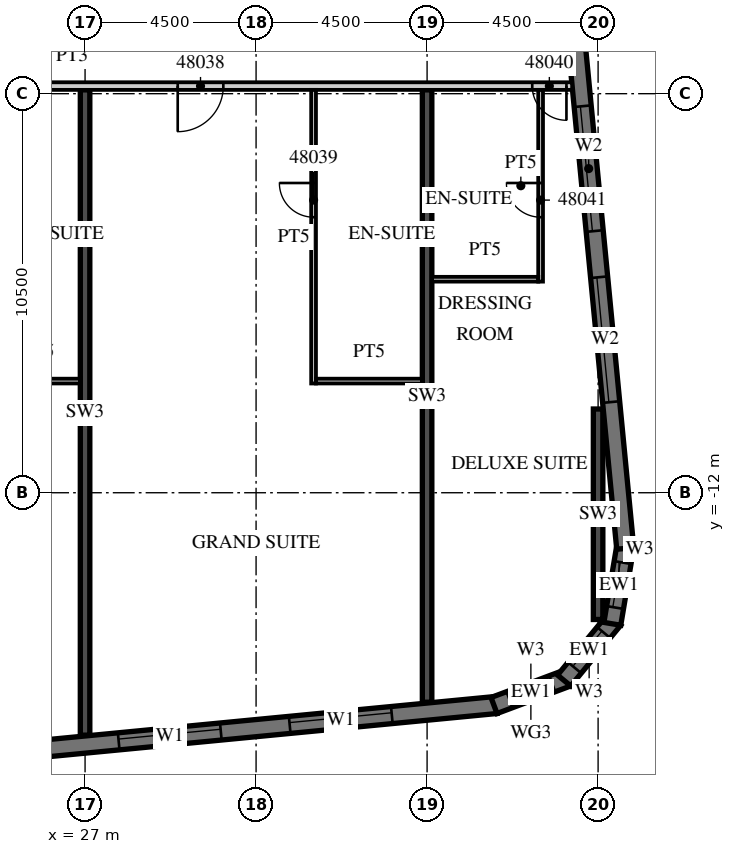
"""IFC4 building model, lengths in metres.
Left out: names, types, materials, properties, quantities, classifications, styles, units other than length and angle.
Written with IfcOpenShell. Run it as: python <this file> out.ifc"""

import sys

from ifc_helpers import new_model, si_unit, direction, frame, frame_2d, origin, place, context, subcontext, project, spatial, polyline, rectangle, outline, extrude, element, fill, save


model = new_model("IFC4")
c1 = context("Model", 3, precision=1e-05, world=origin(), true_north=direction((0.0, 1.0)))
c2 = subcontext(c1, "Body", "Model", "MODEL_VIEW")
j1 = project(units=[si_unit("LENGTHUNIT", "METRE"), si_unit("PLANEANGLEUNIT", "RADIAN")], contexts=[c1])
p1 = place(None, origin())
s1 = spatial("IfcSite", under=j1, at=p1, CompositionType="ELEMENT")
p2 = place(p1, origin())
s2 = spatial("IfcBuilding", under=s1, at=p2, CompositionType="ELEMENT")
p3 = place(p2, frame((0.0, 0.0, 199.9)))
s3 = spatial("IfcBuildingStorey", under=s2, at=p3, CompositionType="ELEMENT", Elevation=199.9)
p4 = place(p3, frame((27.0, -18.379, 0.0), z_axis=(0.0, 0.0, 1.0), x_axis=(0.0, 1.0, 0.0)))
e1 = element("IfcWall", 1, at=p4, inside=s3, PredefinedType="SHEAR", context=c2, shape_type="SweptSolid", body=[
    extrude(rectangle(XDim=16.979, YDim=0.25, at=frame_2d((8.489, 0.0))), origin(), (0.0, 0.0, 1.0), 3.3),
])
p5 = place(p3, frame((36.0, -17.512, 0.0), z_axis=(0.0, 0.0, 1.0), x_axis=(0.0, 1.0, 0.0)))
e2 = element("IfcWall", 2, at=p5, inside=s3, PredefinedType="SHEAR", context=c2, shape_type="SweptSolid", body=[
    extrude(rectangle(XDim=16.112, YDim=0.25, at=frame_2d((8.056, 0.0))), origin(), (0.0, 0.0, 1.0), 3.3),
])
p6 = place(p3, frame((40.5, -15.335, 0.0), z_axis=(0.0, 0.0, 1.0), x_axis=(0.0, 1.0, 0.0)))
e3 = element("IfcWall", 3, at=p6, inside=s3, PredefinedType="SHEAR", context=c2, shape_type="SweptSolid", body=[
    extrude(rectangle(XDim=5.538, YDim=0.25, at=frame_2d((2.769, 0.0))), origin(), (0.0, 0.0, 1.0), 3.3),
])
p7 = place(p3, frame((-13.521, -22.529, 0.0), z_axis=(0.0, 0.0, 1.0), x_axis=(0.995396436651, 0.095843277819, 0.0)))
e4 = element("IfcWall", 4, at=p7, inside=s3, PredefinedType="SOLIDWALL", context=c2, shape_type="SweptSolid", body=[
    extrude(rectangle(XDim=51.578, YDim=0.45, at=frame_2d((25.789, 0.0))), origin(), (0.0, 0.0, 1.0), 3.02),
])
p8 = place(p7, frame((0.91, 0.0, 0.45)))
e5 = element("IfcOpeningElement", 5, at=p8, cuts=e4, PredefinedType="OPENING", context=c2, shape_type="SweptSolid", body=[
    extrude(rectangle(XDim=2.7, YDim=2.25, at=frame_2d((1.35, 1.125))), frame((0.0, 0.235, 0.0), z_axis=(0.0, -1.0, 0.0), x_axis=(1.0, 0.0, 0.0)), (0.0, 0.0, 1.0), 0.47),
])
p9 = place(p7, frame((5.431, 0.0, 0.45)))
e6 = element("IfcOpeningElement", 6, at=p9, cuts=e4, PredefinedType="OPENING", context=c2, shape_type="SweptSolid", body=[
    extrude(rectangle(XDim=2.7, YDim=2.25, at=frame_2d((1.35, 1.125))), frame((0.0, 0.235, 0.0), z_axis=(0.0, -1.0, 0.0), x_axis=(1.0, 0.0, 0.0)), (0.0, 0.0, 1.0), 0.47),
])
p10 = place(p7, frame((9.952, 0.0, 0.45)))
e7 = element("IfcOpeningElement", 7, at=p10, cuts=e4, PredefinedType="OPENING", context=c2, shape_type="SweptSolid", body=[
    extrude(rectangle(XDim=2.7, YDim=2.25, at=frame_2d((1.35, 1.125))), frame((0.0, 0.235, 0.0), z_axis=(0.0, -1.0, 0.0), x_axis=(1.0, 0.0, 0.0)), (0.0, 0.0, 1.0), 0.47),
])
p11 = place(p7, frame((14.473, 0.0, 0.45)))
e8 = element("IfcOpeningElement", 8, at=p11, cuts=e4, PredefinedType="OPENING", context=c2, shape_type="SweptSolid", body=[
    extrude(rectangle(XDim=2.7, YDim=2.25, at=frame_2d((1.35, 1.125))), frame((0.0, 0.235, 0.0), z_axis=(0.0, -1.0, 0.0), x_axis=(1.0, 0.0, 0.0)), (0.0, 0.0, 1.0), 0.47),
])
p12 = place(p7, frame((18.994, 0.0, 0.45)))
e9 = element("IfcOpeningElement", 9, at=p12, cuts=e4, PredefinedType="OPENING", context=c2, shape_type="SweptSolid", body=[
    extrude(rectangle(XDim=2.7, YDim=2.25, at=frame_2d((1.35, 1.125))), frame((0.0, 0.235, 0.0), z_axis=(0.0, -1.0, 0.0), x_axis=(1.0, 0.0, 0.0)), (0.0, 0.0, 1.0), 0.47),
])
p13 = place(p7, frame((23.514, 0.0, 0.45)))
e10 = element("IfcOpeningElement", 10, at=p13, cuts=e4, PredefinedType="OPENING", context=c2, shape_type="SweptSolid", body=[
    extrude(rectangle(XDim=2.7, YDim=2.25, at=frame_2d((1.35, 1.125))), frame((0.0, 0.235, 0.0), z_axis=(0.0, -1.0, 0.0), x_axis=(1.0, 0.0, 0.0)), (0.0, 0.0, 1.0), 0.47),
])
p14 = place(p7, frame((28.035, 0.0, 0.45)))
e11 = element("IfcOpeningElement", 11, at=p14, cuts=e4, PredefinedType="OPENING", context=c2, shape_type="SweptSolid", body=[
    extrude(rectangle(XDim=2.7, YDim=2.25, at=frame_2d((1.35, 1.125))), frame((0.0, 0.235, 0.0), z_axis=(0.0, -1.0, 0.0), x_axis=(1.0, 0.0, 0.0)), (0.0, 0.0, 1.0), 0.47),
])
p15 = place(p7, frame((32.556, 0.0, 0.45)))
e12 = element("IfcOpeningElement", 12, at=p15, cuts=e4, PredefinedType="OPENING", context=c2, shape_type="SweptSolid", body=[
    extrude(rectangle(XDim=2.7, YDim=2.25, at=frame_2d((1.35, 1.125))), frame((0.0, 0.235, 0.0), z_axis=(0.0, -1.0, 0.0), x_axis=(1.0, 0.0, 0.0)), (0.0, 0.0, 1.0), 0.47),
])
p16 = place(p7, frame((37.077, 0.0, 0.45)))
e13 = element("IfcOpeningElement", 13, at=p16, cuts=e4, PredefinedType="OPENING", context=c2, shape_type="SweptSolid", body=[
    extrude(rectangle(XDim=2.7, YDim=2.25, at=frame_2d((1.35, 1.125))), frame((0.0, 0.235, 0.0), z_axis=(0.0, -1.0, 0.0), x_axis=(1.0, 0.0, 0.0)), (0.0, 0.0, 1.0), 0.47),
])
p17 = place(p7, frame((41.598, 0.0, 0.45)))
e14 = element("IfcOpeningElement", 14, at=p17, cuts=e4, PredefinedType="OPENING", context=c2, shape_type="SweptSolid", body=[
    extrude(rectangle(XDim=2.7, YDim=2.25, at=frame_2d((1.35, 1.125))), frame((0.0, 0.235, 0.0), z_axis=(0.0, -1.0, 0.0), x_axis=(1.0, 0.0, 0.0)), (0.0, 0.0, 1.0), 0.47),
])
p18 = place(p7, frame((46.119, 0.0, 0.45)))
e15 = element("IfcOpeningElement", 15, at=p18, cuts=e4, PredefinedType="OPENING", context=c2, shape_type="SweptSolid", body=[
    extrude(rectangle(XDim=2.7, YDim=2.25, at=frame_2d((1.35, 1.125))), frame((0.0, 0.235, 0.0), z_axis=(0.0, -1.0, 0.0), x_axis=(1.0, 0.0, 0.0)), (0.0, 0.0, 1.0), 0.47),
])
p19 = place(p3, frame((37.761, -17.598, 0.0), z_axis=(0.0, 0.0, 1.0), x_axis=(0.936677599948, 0.350192909346, 0.0)))
e16 = element("IfcWall", 16, at=p19, inside=s3, PredefinedType="SOLIDWALL", context=c2, shape_type="SweptSolid", body=[
    extrude(outline(polyline([(0.0, -0.225), (2.071, -0.225), (1.95, 0.225), (0.121, 0.225), (0.0, -0.225)])), origin(), (0.0, 0.0, 1.0), 3.02),
])
p20 = place(p19, frame((0.435, 0.0, 0.45)))
e17 = element("IfcOpeningElement", 17, at=p20, cuts=e16, PredefinedType="OPENING", context=c2, shape_type="SweptSolid", body=[
    extrude(rectangle(XDim=1.2, YDim=2.25, at=frame_2d((0.6, 1.125))), frame((0.0, 0.235, 0.0), z_axis=(0.0, -1.0, 0.0), x_axis=(1.0, 0.0, 0.0)), (0.0, 0.0, 1.0), 0.47),
])
p21 = place(p3, frame((39.606, -16.941, 0.0), z_axis=(0.0, 0.0, 1.0), x_axis=(0.636116318187, 0.771593176315, 0.0)))
e18 = element("IfcWall", 18, at=p21, inside=s3, PredefinedType="SOLIDWALL", context=c2, shape_type="SweptSolid", body=[
    extrude(outline(polyline([(0.0, -0.225), (2.071, -0.225), (1.95, 0.225), (0.121, 0.225), (0.0, -0.225)])), origin(), (0.0, 0.0, 1.0), 3.02),
])
p22 = place(p21, frame((0.435, 0.0, 0.45)))
e19 = element("IfcOpeningElement", 19, at=p22, cuts=e18, PredefinedType="OPENING", context=c2, shape_type="SweptSolid", body=[
    extrude(rectangle(XDim=1.2, YDim=2.25, at=frame_2d((0.6, 1.125))), frame((0.0, 0.235, 0.0), z_axis=(0.0, -1.0, 0.0), x_axis=(1.0, 0.0, 0.0)), (0.0, 0.0, 1.0), 0.47),
])
p23 = place(p3, frame((40.875, -15.449, 0.0), z_axis=(0.0, 0.0, 1.0), x_axis=(0.164953448126, 0.986301353518, 0.0)))
e20 = element("IfcWall", 20, at=p23, inside=s3, PredefinedType="SOLIDWALL", context=c2, shape_type="SweptSolid", body=[
    extrude(outline(polyline([(0.0, -0.225), (2.071, -0.225), (1.95, 0.225), (0.121, 0.225), (0.0, -0.225)])), origin(), (0.0, 0.0, 1.0), 3.02),
])
p24 = place(p23, frame((0.435, 0.0, 0.45)))
e21 = element("IfcOpeningElement", 21, at=p24, cuts=e20, PredefinedType="OPENING", context=c2, shape_type="SweptSolid", body=[
    extrude(rectangle(XDim=1.2, YDim=2.25, at=frame_2d((0.6, 1.125))), frame((0.0, 0.235, 0.0), z_axis=(0.0, -1.0, 0.0), x_axis=(1.0, 0.0, 0.0)), (0.0, 0.0, 1.0), 0.47),
])
p25 = place(p3, frame((41.214, -13.466, 0.0), z_axis=(0.0, 0.0, 1.0), x_axis=(-0.095847314626, 0.995396047952, 0.0)))
e22 = element("IfcWall", 22, at=p25, inside=s3, PredefinedType="SOLIDWALL", context=c2, shape_type="SweptSolid", body=[
    extrude(rectangle(XDim=34.0, YDim=0.45, at=frame_2d((17.0, 0.0))), origin(), (0.0, 0.0, 1.0), 3.02),
])
p26 = place(p25, frame((3.869, 0.0, 0.45)))
e23 = element("IfcOpeningElement", 23, at=p26, cuts=e22, PredefinedType="OPENING", context=c2, shape_type="SweptSolid", body=[
    extrude(rectangle(XDim=3.3, YDim=2.25, at=frame_2d((1.65, 1.125))), frame((0.0, 0.235, 0.0), z_axis=(0.0, -1.0, 0.0), x_axis=(1.0, 0.0, 0.0)), (0.0, 0.0, 1.0), 0.47),
])
p27 = place(p25, frame((8.39, 0.0, 0.45)))
e24 = element("IfcOpeningElement", 24, at=p27, cuts=e22, PredefinedType="OPENING", context=c2, shape_type="SweptSolid", body=[
    extrude(rectangle(XDim=3.3, YDim=2.25, at=frame_2d((1.65, 1.125))), frame((0.0, 0.235, 0.0), z_axis=(0.0, -1.0, 0.0), x_axis=(1.0, 0.0, 0.0)), (0.0, 0.0, 1.0), 0.47),
])
p28 = place(p3, frame((13.5, -1.3, 0.0), z_axis=(0.0, 0.0, 1.0), x_axis=(1.0, 0.0, 0.0)))
e25 = element("IfcWall", 25, at=p28, inside=s3, PredefinedType="PARTITIONING", context=c2, shape_type="SweptSolid", body=[
    extrude(rectangle(XDim=26.317, YDim=0.2, at=frame_2d((13.158, 0.0))), origin(), (0.0, 0.0, 1.0), 3.02),
])
p29 = place(p28, frame((0.575, 0.0, 0.0)))
e26 = element("IfcOpeningElement", 26, at=p29, cuts=e25, PredefinedType="OPENING", context=c2, shape_type="SweptSolid", body=[
    extrude(rectangle(XDim=1.0, YDim=2.1, at=frame_2d((0.5, 1.05))), frame((0.0, 0.11, 0.0), z_axis=(0.0, -1.0, 0.0), x_axis=(1.0, 0.0, 0.0)), (0.0, 0.0, 1.0), 0.22),
])
p30 = place(p28, frame((7.45, 0.0, 0.0)))
e27 = element("IfcOpeningElement", 27, at=p30, cuts=e25, PredefinedType="OPENING", context=c2, shape_type="SweptSolid", body=[
    extrude(rectangle(XDim=1.0, YDim=2.1, at=frame_2d((0.5, 1.05))), frame((0.0, 0.11, 0.0), z_axis=(0.0, -1.0, 0.0), x_axis=(1.0, 0.0, 0.0)), (0.0, 0.0, 1.0), 0.22),
])
p31 = place(p28, frame((9.55, 0.0, 0.0)))
e28 = element("IfcOpeningElement", 28, at=p31, cuts=e25, PredefinedType="OPENING", context=c2, shape_type="SweptSolid", body=[
    extrude(rectangle(XDim=1.0, YDim=2.1, at=frame_2d((0.5, 1.05))), frame((0.0, 0.11, 0.0), z_axis=(0.0, -1.0, 0.0), x_axis=(1.0, 0.0, 0.0)), (0.0, 0.0, 1.0), 0.22),
])
p32 = place(p28, frame((15.938, 0.0, 0.0)))
e29 = element("IfcOpeningElement", 29, at=p32, cuts=e25, PredefinedType="OPENING", context=c2, shape_type="SweptSolid", body=[
    extrude(rectangle(XDim=1.2, YDim=2.1, at=frame_2d((0.6, 1.05))), frame((0.0, 0.11, 0.0), z_axis=(0.0, -1.0, 0.0), x_axis=(1.0, 0.0, 0.0)), (0.0, 0.0, 1.0), 0.22),
])
p33 = place(p28, frame((25.267, 0.0, 0.0)))
e30 = element("IfcOpeningElement", 30, at=p33, cuts=e25, PredefinedType="OPENING", context=c2, shape_type="SweptSolid", body=[
    extrude(rectangle(XDim=0.9, YDim=2.1, at=frame_2d((0.45, 1.05))), frame((0.0, 0.11, 0.0), z_axis=(0.0, -1.0, 0.0), x_axis=(1.0, 0.0, 0.0)), (0.0, 0.0, 1.0), 0.22),
])
p34 = place(p3, frame((24.625, -9.062, 0.0), z_axis=(0.0, 0.0, 1.0), x_axis=(1.0, 0.0, 0.0)))
e31 = element("IfcWall", 31, at=p34, inside=s3, PredefinedType="PARTITIONING", context=c2, shape_type="SweptSolid", body=[
    extrude(rectangle(XDim=2.25, YDim=0.125, at=frame_2d((1.125, 0.0))), origin(), (0.0, 0.0, 1.0), 3.02),
])
p35 = place(p3, frame((33.013, -9.125, 0.0), z_axis=(0.0, 0.0, 1.0), x_axis=(0.0, 1.0, 0.0)))
e32 = element("IfcWall", 32, at=p35, inside=s3, PredefinedType="PARTITIONING", context=c2, shape_type="SweptSolid", body=[
    extrude(rectangle(XDim=7.725, YDim=0.125, at=frame_2d((3.863, 0.0))), origin(), (0.0, 0.0, 1.0), 3.02),
])
p36 = place(p35, frame((4.375, 0.0, 0.0)))
e33 = element("IfcOpeningElement", 33, at=p36, cuts=e32, PredefinedType="OPENING", context=c2, shape_type="SweptSolid", body=[
    extrude(rectangle(XDim=0.9, YDim=2.1, at=frame_2d((0.45, 1.05))), frame((0.0, 0.073, 0.0), z_axis=(0.0, -1.0, 0.0), x_axis=(1.0, 0.0, 0.0)), (0.0, 0.0, 1.0), 0.145),
])
p37 = place(p3, frame((33.075, -9.062, 0.0), z_axis=(0.0, 0.0, 1.0), x_axis=(1.0, 0.0, 0.0)))
e34 = element("IfcWall", 34, at=p37, inside=s3, PredefinedType="PARTITIONING", context=c2, shape_type="SweptSolid", body=[
    extrude(rectangle(XDim=2.8, YDim=0.125, at=frame_2d((1.4, 0.0))), origin(), (0.0, 0.0, 1.0), 3.02),
])
p38 = place(p3, frame((38.987, -6.445, 0.0), z_axis=(0.0, 0.0, 1.0), x_axis=(0.0, 1.0, 0.0)))
e35 = element("IfcWall", 35, at=p38, inside=s3, PredefinedType="PARTITIONING", context=c2, shape_type="SweptSolid", body=[
    extrude(rectangle(XDim=5.045, YDim=0.125, at=frame_2d((2.522, 0.0))), origin(), (0.0, 0.0, 1.0), 3.02),
])
p39 = place(p38, frame((1.695, 0.0, 0.0)))
e36 = element("IfcOpeningElement", 36, at=p39, cuts=e35, PredefinedType="OPENING", context=c2, shape_type="SweptSolid", body=[
    extrude(rectangle(XDim=0.9, YDim=2.1, at=frame_2d((0.45, 1.05))), frame((0.0, 0.073, 0.0), z_axis=(0.0, -1.0, 0.0), x_axis=(1.0, 0.0, 0.0)), (0.0, 0.0, 1.0), 0.145),
])
p40 = place(p3, frame((36.125, -6.382, 0.0), z_axis=(0.0, 0.0, 1.0), x_axis=(1.0, 0.0, 0.0)))
e37 = element("IfcWall", 37, at=p40, inside=s3, PredefinedType="PARTITIONING", context=c2, shape_type="SweptSolid", body=[
    extrude(rectangle(XDim=2.8, YDim=0.125, at=frame_2d((1.4, 0.0))), origin(), (0.0, 0.0, 1.0), 3.02),
])
p41 = place(p17, origin())
e38 = element("IfcWindow", 38, at=p41, inside=s3, PartitioningType="SINGLE_PANEL", PredefinedType="WINDOW", context=c2, shape_type="SweptSolid", body=[
    extrude(rectangle(XDim=2.7, YDim=2.25, at=frame_2d((1.35, 1.125))), frame((0.0, 0.09, 0.0), z_axis=(0.0, -1.0, 0.0), x_axis=(1.0, 0.0, 0.0)), (0.0, 0.0, 1.0), 0.06),
])
fill(e14, e38)
p42 = place(p18, origin())
e39 = element("IfcWindow", 39, at=p42, inside=s3, PartitioningType="SINGLE_PANEL", PredefinedType="WINDOW", context=c2, shape_type="SweptSolid", body=[
    extrude(rectangle(XDim=2.7, YDim=2.25, at=frame_2d((1.35, 1.125))), frame((0.0, 0.09, 0.0), z_axis=(0.0, -1.0, 0.0), x_axis=(1.0, 0.0, 0.0)), (0.0, 0.0, 1.0), 0.06),
])
fill(e15, e39)
p43 = place(p20, origin())
e40 = element("IfcWindow", 40, at=p43, inside=s3, PartitioningType="SINGLE_PANEL", PredefinedType="WINDOW", context=c2, shape_type="SweptSolid", body=[
    extrude(rectangle(XDim=1.2, YDim=2.25, at=frame_2d((0.6, 1.125))), frame((0.0, 0.09, 0.0), z_axis=(0.0, -1.0, 0.0), x_axis=(1.0, 0.0, 0.0)), (0.0, 0.0, 1.0), 0.06),
])
fill(e17, e40)
p44 = place(p22, origin())
e41 = element("IfcWindow", 41, at=p44, inside=s3, PartitioningType="SINGLE_PANEL", PredefinedType="WINDOW", context=c2, shape_type="SweptSolid", body=[
    extrude(rectangle(XDim=1.2, YDim=2.25, at=frame_2d((0.6, 1.125))), frame((0.0, 0.09, 0.0), z_axis=(0.0, -1.0, 0.0), x_axis=(1.0, 0.0, 0.0)), (0.0, 0.0, 1.0), 0.06),
])
fill(e19, e41)
p45 = place(p24, origin())
e42 = element("IfcWindow", 42, at=p45, inside=s3, PartitioningType="SINGLE_PANEL", PredefinedType="WINDOW", context=c2, shape_type="SweptSolid", body=[
    extrude(rectangle(XDim=1.2, YDim=2.25, at=frame_2d((0.6, 1.125))), frame((0.0, 0.09, 0.0), z_axis=(0.0, -1.0, 0.0), x_axis=(1.0, 0.0, 0.0)), (0.0, 0.0, 1.0), 0.06),
])
fill(e21, e42)
p46 = place(p26, origin())
e43 = element("IfcWindow", 43, at=p46, inside=s3, PartitioningType="SINGLE_PANEL", PredefinedType="WINDOW", context=c2, shape_type="SweptSolid", body=[
    extrude(rectangle(XDim=3.3, YDim=2.25, at=frame_2d((1.65, 1.125))), frame((0.0, 0.09, 0.0), z_axis=(0.0, -1.0, 0.0), x_axis=(1.0, 0.0, 0.0)), (0.0, 0.0, 1.0), 0.06),
])
fill(e23, e43)
p47 = place(p27, origin())
e44 = element("IfcWindow", 44, at=p47, inside=s3, PartitioningType="SINGLE_PANEL", PredefinedType="WINDOW", context=c2, shape_type="SweptSolid", body=[
    extrude(rectangle(XDim=3.3, YDim=2.25, at=frame_2d((1.65, 1.125))), frame((0.0, 0.09, 0.0), z_axis=(0.0, -1.0, 0.0), x_axis=(1.0, 0.0, 0.0)), (0.0, 0.0, 1.0), 0.06),
])
fill(e24, e44)
p48 = place(p32, origin())
e45 = element("IfcDoor", 45, at=p48, inside=s3, OperationType="SINGLE_SWING_LEFT", PredefinedType="DOOR", context=c2, shape_type="SweptSolid", body=[
    extrude(rectangle(XDim=1.2, YDim=2.1, at=frame_2d((0.6, 1.05))), frame((0.0, 0.025, 0.0), z_axis=(0.0, -1.0, 0.0), x_axis=(1.0, 0.0, 0.0)), (0.0, 0.0, 1.0), 0.05),
])
fill(e29, e45)
p49 = place(p36, origin())
e46 = element("IfcDoor", 46, at=p49, inside=s3, OperationType="SINGLE_SWING_RIGHT", PredefinedType="DOOR", context=c2, shape_type="SweptSolid", body=[
    extrude(rectangle(XDim=0.9, YDim=2.1, at=frame_2d((0.45, 1.05))), frame((0.0, 0.025, 0.0), z_axis=(0.0, -1.0, 0.0), x_axis=(1.0, 0.0, 0.0)), (0.0, 0.0, 1.0), 0.05),
])
fill(e33, e46)
p50 = place(p33, origin())
e47 = element("IfcDoor", 47, at=p50, inside=s3, OperationType="SINGLE_SWING_RIGHT", PredefinedType="DOOR", context=c2, shape_type="SweptSolid", body=[
    extrude(rectangle(XDim=0.9, YDim=2.1, at=frame_2d((0.45, 1.05))), frame((0.0, 0.025, 0.0), z_axis=(0.0, -1.0, 0.0), x_axis=(1.0, 0.0, 0.0)), (0.0, 0.0, 1.0), 0.05),
])
fill(e30, e47)
p51 = place(p39, origin())
e48 = element("IfcDoor", 48, at=p51, inside=s3, OperationType="SINGLE_SWING_RIGHT", PredefinedType="DOOR", context=c2, shape_type="SweptSolid", body=[
    extrude(rectangle(XDim=0.9, YDim=2.1, at=frame_2d((0.45, 1.05))), frame((0.0, 0.025, 0.0), z_axis=(0.0, -1.0, 0.0), x_axis=(1.0, 0.0, 0.0)), (0.0, 0.0, 1.0), 0.05),
])
fill(e36, e48)
save(model, sys.argv[1])
